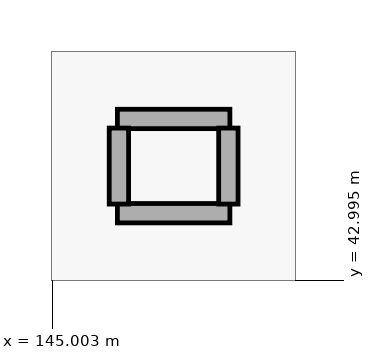
"""IFC4 building model, lengths in metres.
Left out: names, types, materials, properties, quantities, classifications, styles, units other than length and angle.
Written with IfcOpenShell. Run it as: python <this file> out.ifc"""

import sys

from ifc_helpers import new_model, si_unit, direction, frame, frame_2d, origin, place, context, subcontext, project, spatial, rectangle, extrude, element, save


model = new_model("IFC4")
c1 = context("Model", 3, precision=1e-05, world=origin(), true_north=direction((0.0, 1.0)))
c2 = subcontext(c1, "Body", "Model", "MODEL_VIEW")
j1 = project(units=[si_unit("LENGTHUNIT", "METRE"), si_unit("PLANEANGLEUNIT", "RADIAN")], contexts=[c1])
p1 = place(None, origin())
s1 = spatial("IfcSite", under=j1, at=p1, CompositionType="ELEMENT")
p2 = place(p1, origin())
s2 = spatial("IfcBuilding", under=s1, at=p2, CompositionType="ELEMENT")
p3 = place(p2, frame((0.0, 0.0, 10.5)))
s3 = spatial("IfcBuildingStorey", under=s2, at=p3, CompositionType="ELEMENT", Elevation=10.5)
for number, where, z_axis, x_axis in (
    (1, (145.86, 45.12, 0.0), (0.0, 0.0, 1.0), (1.0, 0.0, 0.0)),
    (2, (145.86, 43.88, 0.0), (0.0, 0.0, 1.0), (1.0, 0.0, 0.0)),
):
    element("IfcWall", number, at=place(p3, frame(where, z_axis=z_axis, x_axis=x_axis)), inside=s3, PredefinedType="PARTITIONING", context=c2, shape_type="SweptSolid", body=[
        extrude(rectangle(XDim=1.48, YDim=0.255, at=frame_2d((0.74, 0.0))), origin(), (0.0, 0.0, 1.0), 4.72),
    ])
for number, where, z_axis, x_axis in (
    (3, (145.88, 44.0, 0.0), (0.0, 0.0, 1.0), (0.0, 1.0, 0.0)),
    (4, (147.32, 44.0, 0.0), (0.0, 0.0, 1.0), (0.0, 1.0, 0.0)),
):
    element("IfcWall", number, at=place(p3, frame(where, z_axis=z_axis, x_axis=x_axis)), inside=s3, PredefinedType="PARTITIONING", context=c2, shape_type="SweptSolid", body=[
        extrude(rectangle(XDim=1.0, YDim=0.255, at=frame_2d((0.5, 0.0))), origin(), (0.0, 0.0, 1.0), 4.72),
    ])
save(model, sys.argv[1])
